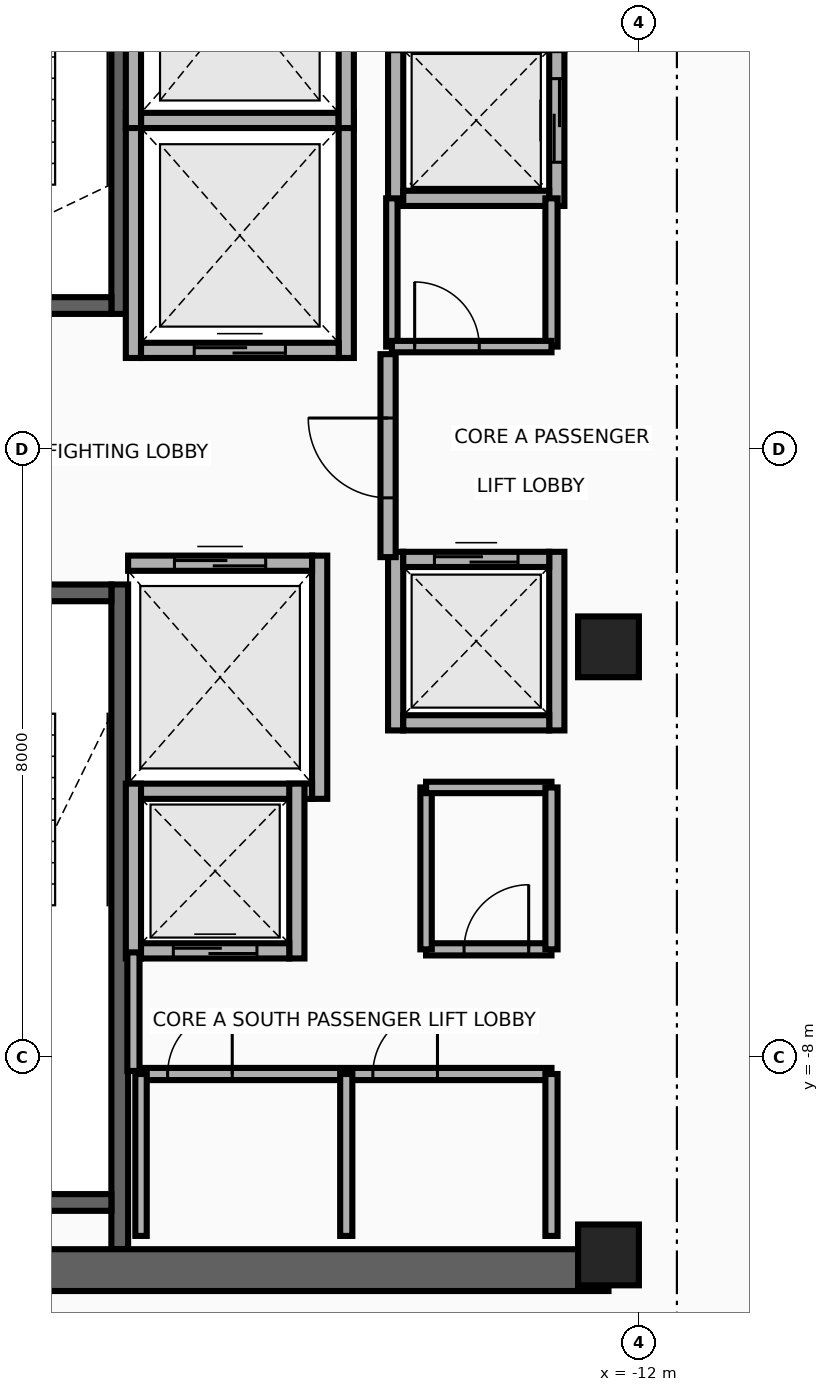
"""IFC4 building model, lengths in metres.
Left out: names, types, materials, properties, quantities, classifications, styles, units other than length and angle.
Written with IfcOpenShell. Run it as: python <this file> out.ifc"""

import sys

from ifc_helpers import new_model, si_unit, direction, frame, frame_2d, origin, origin_2d, place, context, subcontext, project, spatial, rectangle, extrude, source, transform, mapped, element, fill, save


model = new_model("IFC4")
c1 = context("Model", 3, precision=1e-05, world=origin(), true_north=direction((0.0, 1.0)))
c2 = subcontext(c1, "Body", "Model", "MODEL_VIEW")
j1 = project(units=[si_unit("LENGTHUNIT", "METRE"), si_unit("PLANEANGLEUNIT", "RADIAN")], contexts=[c1])
p1 = place(None, origin())
s1 = spatial("IfcSite", under=j1, at=p1, CompositionType="ELEMENT")
p2 = place(p1, origin())
s2 = spatial("IfcBuilding", under=s1, at=p2, CompositionType="ELEMENT")
p3 = place(p2, frame((0.0, 0.0, 244.0)))
s3 = spatial("IfcBuildingStorey", under=s2, at=p3, CompositionType="ELEMENT", Elevation=244.0)
p4 = place(p3, frame((-18.83, 1.78, 0.0), z_axis=(0.0, 0.0, 1.0), x_axis=(0.0, 1.0, 0.0)))
e1 = element("IfcWall", 1, at=p4, inside=s3, PredefinedType="SHEAR", context=c2, shape_type="SweptSolid", body=[
    extrude(rectangle(XDim=8.745, YDim=0.22, at=frame_2d((4.373, 0.0))), origin(), (0.0, 0.0, 1.0), 3.26),
])
p5 = place(p3, frame((-22.05, 1.89, 0.0), z_axis=(0.0, 0.0, 1.0), x_axis=(1.0, 0.0, 0.0)))
e2 = element("IfcWall", 2, at=p5, inside=s3, PredefinedType="SHEAR", context=c2, shape_type="SweptSolid", body=[
    extrude(rectangle(XDim=3.11, YDim=0.22, at=frame_2d((1.555, 0.0))), origin(), (0.0, 0.0, 1.0), 3.26),
])
p6 = place(p5, frame((1.0, 0.0, 0.0)))
e3 = element("IfcOpeningElement", 3, at=p6, cuts=e2, PredefinedType="OPENING", context=c2, shape_type="SweptSolid", body=[
    extrude(rectangle(XDim=1.1, YDim=2.15, at=frame_2d((0.55, 1.075))), frame((0.0, 0.125, 0.0), z_axis=(0.0, -1.0, 0.0), x_axis=(1.0, 0.0, 0.0)), (0.0, 0.0, 1.0), 0.25),
])
p7 = place(p3, frame((-18.83, -10.525, 0.0), z_axis=(0.0, 0.0, 1.0), x_axis=(0.0, 1.0, 0.0)))
e4 = element("IfcWall", 4, at=p7, inside=s3, PredefinedType="SHEAR", context=c2, shape_type="SweptSolid", body=[
    extrude(rectangle(XDim=8.745, YDim=0.22, at=frame_2d((4.373, 0.0))), origin(), (0.0, 0.0, 1.0), 3.26),
])
p8 = place(p3, frame((-22.05, -9.91, 0.0), z_axis=(0.0, 0.0, 1.0), x_axis=(1.0, 0.0, 0.0)))
e5 = element("IfcWall", 5, at=p8, inside=s3, PredefinedType="SHEAR", context=c2, shape_type="SweptSolid", body=[
    extrude(rectangle(XDim=3.11, YDim=0.22, at=frame_2d((1.555, 0.0))), origin(), (0.0, 0.0, 1.0), 3.26),
])
p9 = place(p3, frame((-22.05, -1.89, 0.0), z_axis=(0.0, 0.0, 1.0), x_axis=(1.0, 0.0, 0.0)))
e6 = element("IfcWall", 6, at=p9, inside=s3, PredefinedType="SHEAR", context=c2, shape_type="SweptSolid", body=[
    extrude(rectangle(XDim=3.11, YDim=0.22, at=frame_2d((1.555, 0.0))), origin(), (0.0, 0.0, 1.0), 3.26),
])
p10 = place(p9, frame((1.0, 0.0, 0.0)))
e7 = element("IfcOpeningElement", 7, at=p10, cuts=e6, PredefinedType="OPENING", context=c2, shape_type="SweptSolid", body=[
    extrude(rectangle(XDim=1.1, YDim=2.15, at=frame_2d((0.55, 1.075))), frame((0.0, 0.125, 0.0), z_axis=(0.0, -1.0, 0.0), x_axis=(1.0, 0.0, 0.0)), (0.0, 0.0, 1.0), 0.25),
])
p11 = place(p3, frame((-22.65, -10.8, 0.0), z_axis=(0.0, 0.0, 1.0), x_axis=(1.0, 0.0, 0.0)))
e8 = element("IfcWall", 8, at=p11, inside=s3, PredefinedType="SHEAR", context=c2, shape_type="SweptSolid", body=[
    extrude(rectangle(XDim=10.25, YDim=0.55, at=frame_2d((5.125, 0.0))), origin(), (0.0, 0.0, 1.0), 3.26),
])
m1 = source(origin(), c2, "Body", "SweptSolid", [
    extrude(rectangle(XDim=0.8, YDim=0.8, at=origin_2d()), origin(), (0.0, 0.0, 1.0), 3.5),
])
for number, where, z_axis, x_axis in (
    (9, (-12.4, -10.6, 0.0), (0.0, 0.0, 1.0), (1.0, 0.0, 0.0)),
    (10, (-12.4, -2.6, 0.0), (0.0, 0.0, 1.0), (1.0, 0.0, 0.0)),
):
    element("IfcColumn", number, at=place(p3, frame(where, z_axis=z_axis, x_axis=x_axis)), inside=s3, PredefinedType="COLUMN", context=c2, shape_type="MappedRepresentation", body=[
        mapped(m1, transform((0.0, 0.0, 0.0), x_axis=(1.0, 0.0, 0.0), y_axis=(0.0, 1.0, 0.0), z_axis=(0.0, 0.0, 1.0), scale=1.0)),
    ])
for number, where, z_axis, x_axis in (
    (11, (-18.65, 1.2, 0.0), (0.0, 0.0, 1.0), (0.0, 1.0, 0.0)),
    (12, (-15.85, 1.2, 0.0), (0.0, 0.0, 1.0), (0.0, 1.0, 0.0)),
):
    element("IfcWall", number, at=place(p3, frame(where, z_axis=z_axis, x_axis=x_axis)), inside=s3, PredefinedType="MOVABLE", context=c2, shape_type="SweptSolid", body=[
        extrude(rectangle(XDim=3.225, YDim=0.2, at=frame_2d((1.613, 0.0))), origin(), (0.0, 0.0, 1.0), 3.26),
    ])
p12 = place(p3, frame((-18.55, 1.3, 0.0), z_axis=(0.0, 0.0, 1.0), x_axis=(1.0, 0.0, 0.0)))
e13 = element("IfcWall", 13, at=p12, inside=s3, PredefinedType="MOVABLE", context=c2, shape_type="SweptSolid", body=[
    extrude(rectangle(XDim=2.6, YDim=0.2, at=frame_2d((1.3, 0.0))), origin(), (0.0, 0.0, 1.0), 3.26),
])
p13 = place(p12, frame((0.7, 0.0, 0.0)))
e14 = element("IfcOpeningElement", 14, at=p13, cuts=e13, PredefinedType="OPENING", context=c2, shape_type="SweptSolid", body=[
    extrude(rectangle(XDim=1.2, YDim=2.1, at=frame_2d((0.6, 1.05))), frame((0.0, 0.115, 0.0), z_axis=(0.0, -1.0, 0.0), x_axis=(1.0, 0.0, 0.0)), (0.0, 0.0, 1.0), 0.23),
])
p14 = place(p3, frame((-18.55, 4.325, 0.0), z_axis=(0.0, 0.0, 1.0), x_axis=(1.0, 0.0, 0.0)))
e15 = element("IfcWall", 15, at=p14, inside=s3, PredefinedType="MOVABLE", context=c2, shape_type="SweptSolid", body=[
    extrude(rectangle(XDim=2.6, YDim=0.2, at=frame_2d((1.3, 0.0))), origin(), (0.0, 0.0, 1.0), 3.26),
])
p15 = place(p3, frame((-16.2, -4.6, 0.0), z_axis=(0.0, 0.0, 1.0), x_axis=(0.0, 1.0, 0.0)))
e16 = element("IfcWall", 16, at=p15, inside=s3, PredefinedType="MOVABLE", context=c2, shape_type="SweptSolid", body=[
    extrude(rectangle(XDim=3.2, YDim=0.2, at=frame_2d((1.6, 0.0))), origin(), (0.0, 0.0, 1.0), 3.26),
])
p16 = place(p3, frame((-18.72, -4.5, 0.0), z_axis=(0.0, 0.0, 1.0), x_axis=(1.0, 0.0, 0.0)))
e17 = element("IfcWall", 17, at=p16, inside=s3, PredefinedType="MOVABLE", context=c2, shape_type="SweptSolid", body=[
    extrude(rectangle(XDim=2.42, YDim=0.2, at=frame_2d((1.21, 0.0))), origin(), (0.0, 0.0, 1.0), 3.26),
])
p17 = place(p3, frame((-18.72, -1.5, 0.0), z_axis=(0.0, 0.0, 1.0), x_axis=(1.0, 0.0, 0.0)))
e18 = element("IfcWall", 18, at=p17, inside=s3, PredefinedType="MOVABLE", context=c2, shape_type="SweptSolid", body=[
    extrude(rectangle(XDim=2.42, YDim=0.2, at=frame_2d((1.21, 0.0))), origin(), (0.0, 0.0, 1.0), 3.26),
])
p18 = place(p17, frame((0.61, 0.0, 0.0)))
e19 = element("IfcOpeningElement", 19, at=p18, cuts=e18, PredefinedType="OPENING", context=c2, shape_type="SweptSolid", body=[
    extrude(rectangle(XDim=1.2, YDim=2.1, at=frame_2d((0.6, 1.05))), frame((0.0, 0.115, 0.0), z_axis=(0.0, -1.0, 0.0), x_axis=(1.0, 0.0, 0.0)), (0.0, 0.0, 1.0), 0.23),
])
for number, where, z_axis, x_axis in (
    (20, (-18.65, 4.225, 0.0), (0.0, 0.0, 1.0), (0.0, 1.0, 0.0)),
    (21, (-15.85, 4.225, 0.0), (0.0, 0.0, 1.0), (0.0, 1.0, 0.0)),
):
    element("IfcWall", number, at=place(p3, frame(where, z_axis=z_axis, x_axis=x_axis)), inside=s3, PredefinedType="MOVABLE", context=c2, shape_type="SweptSolid", body=[
        extrude(rectangle(XDim=3.325, YDim=0.2, at=frame_2d((1.663, 0.0))), origin(), (0.0, 0.0, 1.0), 3.26),
    ])
p19 = place(p3, frame((-15.2, 3.2, 0.0), z_axis=(0.0, 0.0, 1.0), x_axis=(0.0, 1.0, 0.0)))
e22 = element("IfcWall", 22, at=p19, inside=s3, PredefinedType="MOVABLE", context=c2, shape_type="SweptSolid", body=[
    extrude(rectangle(XDim=2.25, YDim=0.2, at=frame_2d((1.125, 0.0))), origin(), (0.0, 0.0, 1.0), 3.26),
])
p20 = place(p3, frame((-13.08, 3.2, 0.0), z_axis=(0.0, 0.0, 1.0), x_axis=(0.0, 1.0, 0.0)))
e23 = element("IfcWall", 23, at=p20, inside=s3, PredefinedType="MOVABLE", context=c2, shape_type="SweptSolid", body=[
    extrude(rectangle(XDim=2.25, YDim=0.2, at=frame_2d((1.125, 0.0))), origin(), (0.0, 0.0, 1.0), 3.26),
])
p21 = place(p20, frame((0.575, 0.0, 0.0)))
e24 = element("IfcOpeningElement", 24, at=p21, cuts=e23, PredefinedType="OPENING", context=c2, shape_type="SweptSolid", body=[
    extrude(rectangle(XDim=1.1, YDim=2.1, at=frame_2d((0.55, 1.05))), frame((0.0, 0.115, 0.0), z_axis=(0.0, -1.0, 0.0), x_axis=(1.0, 0.0, 0.0)), (0.0, 0.0, 1.0), 0.23),
])
p22 = place(p3, frame((-15.1, 3.3, 0.0), z_axis=(0.0, 0.0, 1.0), x_axis=(1.0, 0.0, 0.0)))
e25 = element("IfcWall", 25, at=p22, inside=s3, PredefinedType="MOVABLE", context=c2, shape_type="SweptSolid", body=[
    extrude(rectangle(XDim=1.92, YDim=0.2, at=frame_2d((0.96, 0.0))), origin(), (0.0, 0.0, 1.0), 3.26),
])
for number, where, z_axis, x_axis in (
    (26, (-18.65, -6.7, 0.0), (0.0, 0.0, 1.0), (0.0, 1.0, 0.0)),
    (27, (-16.5, -6.7, 0.0), (0.0, 0.0, 1.0), (0.0, 1.0, 0.0)),
):
    element("IfcWall", number, at=place(p3, frame(where, z_axis=z_axis, x_axis=x_axis)), inside=s3, PredefinedType="MOVABLE", context=c2, shape_type="SweptSolid", body=[
        extrude(rectangle(XDim=2.3, YDim=0.2, at=frame_2d((1.15, 0.0))), origin(), (0.0, 0.0, 1.0), 3.26),
    ])
p23 = place(p3, frame((-18.55, -6.6, 0.0), z_axis=(0.0, 0.0, 1.0), x_axis=(1.0, 0.0, 0.0)))
e28 = element("IfcWall", 28, at=p23, inside=s3, PredefinedType="MOVABLE", context=c2, shape_type="SweptSolid", body=[
    extrude(rectangle(XDim=1.95, YDim=0.2, at=frame_2d((0.975, 0.0))), origin(), (0.0, 0.0, 1.0), 3.26),
])
p24 = place(p23, frame((0.425, 0.0, 0.0)))
e29 = element("IfcOpeningElement", 29, at=p24, cuts=e28, PredefinedType="OPENING", context=c2, shape_type="SweptSolid", body=[
    extrude(rectangle(XDim=1.1, YDim=2.1, at=frame_2d((0.55, 1.05))), frame((0.0, 0.115, 0.0), z_axis=(0.0, -1.0, 0.0), x_axis=(1.0, 0.0, 0.0)), (0.0, 0.0, 1.0), 0.23),
])
for number, where, z_axis, x_axis in (
    (30, (-15.2, -3.7, 0.0), (0.0, 0.0, 1.0), (0.0, 1.0, 0.0)),
    (31, (-13.08, -3.7, 0.0), (0.0, 0.0, 1.0), (0.0, 1.0, 0.0)),
):
    element("IfcWall", number, at=place(p3, frame(where, z_axis=z_axis, x_axis=x_axis)), inside=s3, PredefinedType="MOVABLE", context=c2, shape_type="SweptSolid", body=[
        extrude(rectangle(XDim=2.35, YDim=0.2, at=frame_2d((1.175, 0.0))), origin(), (0.0, 0.0, 1.0), 3.26),
    ])
p25 = place(p3, frame((-15.1, -3.6, 0.0), z_axis=(0.0, 0.0, 1.0), x_axis=(1.0, 0.0, 0.0)))
e32 = element("IfcWall", 32, at=p25, inside=s3, PredefinedType="MOVABLE", context=c2, shape_type="SweptSolid", body=[
    extrude(rectangle(XDim=1.92, YDim=0.2, at=frame_2d((0.96, 0.0))), origin(), (0.0, 0.0, 1.0), 3.26),
])
p26 = place(p3, frame((-15.1, -1.45, 0.0), z_axis=(0.0, 0.0, 1.0), x_axis=(1.0, 0.0, 0.0)))
e33 = element("IfcWall", 33, at=p26, inside=s3, PredefinedType="MOVABLE", context=c2, shape_type="SweptSolid", body=[
    extrude(rectangle(XDim=1.92, YDim=0.2, at=frame_2d((0.96, 0.0))), origin(), (0.0, 0.0, 1.0), 3.26),
])
p27 = place(p26, frame((0.41, 0.0, 0.0)))
e34 = element("IfcOpeningElement", 34, at=p27, cuts=e33, PredefinedType="OPENING", context=c2, shape_type="SweptSolid", body=[
    extrude(rectangle(XDim=1.1, YDim=2.1, at=frame_2d((0.55, 1.05))), frame((0.0, 0.115, 0.0), z_axis=(0.0, -1.0, 0.0), x_axis=(1.0, 0.0, 0.0)), (0.0, 0.0, 1.0), 0.23),
])
p28 = place(p3, frame((-15.3, -1.42, 0.0), z_axis=(0.0, 0.0, 1.0), x_axis=(0.0, 1.0, 0.0)))
e35 = element("IfcWall", 35, at=p28, inside=s3, PredefinedType="PARTITIONING", context=c2, shape_type="SweptSolid", body=[
    extrude(rectangle(XDim=2.67, YDim=0.2, at=frame_2d((1.335, 0.0))), origin(), (0.0, 0.0, 1.0), 3.26),
])
p29 = place(p28, frame((0.78, 0.0, 0.0)))
e36 = element("IfcOpeningElement", 36, at=p29, cuts=e35, PredefinedType="OPENING", context=c2, shape_type="SweptSolid", body=[
    extrude(rectangle(XDim=1.05, YDim=2.15, at=frame_2d((0.525, 1.075))), frame((0.0, 0.115, 0.0), z_axis=(0.0, -1.0, 0.0), x_axis=(1.0, 0.0, 0.0)), (0.0, 0.0, 1.0), 0.23),
])
p30 = place(p3, frame((-18.65, -8.18, 0.0), z_axis=(0.0, 0.0, 1.0), x_axis=(0.0, 1.0, 0.0)))
e37 = element("IfcWall", 37, at=p30, inside=s3, PredefinedType="PARTITIONING", context=c2, shape_type="SweptSolid", body=[
    extrude(rectangle(XDim=1.56, YDim=0.16, at=frame_2d((0.78, 0.0))), origin(), (0.0, 0.0, 1.0), 3.26),
])
p31 = place(p3, frame((-18.55, -8.22, 0.0), z_axis=(0.0, 0.0, 1.0), x_axis=(1.0, 0.0, 0.0)))
e38 = element("IfcWall", 38, at=p31, inside=s3, PredefinedType="PARTITIONING", context=c2, shape_type="SweptSolid", body=[
    extrude(rectangle(XDim=5.4, YDim=0.16, at=frame_2d((2.7, 0.0))), origin(), (0.0, 0.0, 1.0), 3.26),
])
p32 = place(p31, frame((0.35, 0.0, 0.0)))
e39 = element("IfcOpeningElement", 39, at=p32, cuts=e38, PredefinedType="OPENING", context=c2, shape_type="SweptSolid", body=[
    extrude(rectangle(XDim=0.85, YDim=2.05, at=frame_2d((0.425, 1.025))), frame((0.0, 0.095, 0.0), z_axis=(0.0, -1.0, 0.0), x_axis=(1.0, 0.0, 0.0)), (0.0, 0.0, 1.0), 0.19),
])
p33 = place(p31, frame((3.05, 0.0, 0.0)))
e40 = element("IfcOpeningElement", 40, at=p33, cuts=e38, PredefinedType="OPENING", context=c2, shape_type="SweptSolid", body=[
    extrude(rectangle(XDim=0.85, YDim=2.05, at=frame_2d((0.425, 1.025))), frame((0.0, 0.095, 0.0), z_axis=(0.0, -1.0, 0.0), x_axis=(1.0, 0.0, 0.0)), (0.0, 0.0, 1.0), 0.19),
])
p34 = place(p3, frame((-18.55, -10.35, 0.0), z_axis=(0.0, 0.0, 1.0), x_axis=(0.0, 1.0, 0.0)))
e41 = element("IfcWall", 41, at=p34, inside=s3, PredefinedType="PARTITIONING", context=c2, shape_type="SweptSolid", body=[
    extrude(rectangle(XDim=2.13, YDim=0.15, at=frame_2d((1.065, 0.0))), origin(), (0.0, 0.0, 1.0), 3.26),
])
for number, where, z_axis, x_axis in (
    (42, (-13.15, -10.35, 0.0), (0.0, 0.0, 1.0), (0.0, 1.0, 0.0)),
    (43, (-15.85, -10.35, 0.0), (0.0, 0.0, 1.0), (0.0, 1.0, 0.0)),
):
    element("IfcWall", number, at=place(p3, frame(where, z_axis=z_axis, x_axis=x_axis)), inside=s3, PredefinedType="PARTITIONING", context=c2, shape_type="SweptSolid", body=[
        extrude(rectangle(XDim=2.13, YDim=0.16, at=frame_2d((1.065, 0.0))), origin(), (0.0, 0.0, 1.0), 3.26),
    ])
p35 = place(p3, frame((-14.8, -6.58, 0.0), z_axis=(0.0, 0.0, 1.0), x_axis=(1.0, 0.0, 0.0)))
e44 = element("IfcWall", 44, at=p35, inside=s3, PredefinedType="PARTITIONING", context=c2, shape_type="SweptSolid", body=[
    extrude(rectangle(XDim=1.65, YDim=0.16, at=frame_2d((0.825, 0.0))), origin(), (0.0, 0.0, 1.0), 3.26),
])
p36 = place(p35, frame((0.5, 0.0, 0.0)))
e45 = element("IfcOpeningElement", 45, at=p36, cuts=e44, PredefinedType="OPENING", context=c2, shape_type="SweptSolid", body=[
    extrude(rectangle(XDim=0.85, YDim=2.05, at=frame_2d((0.425, 1.025))), frame((0.0, 0.095, 0.0), z_axis=(0.0, -1.0, 0.0), x_axis=(1.0, 0.0, 0.0)), (0.0, 0.0, 1.0), 0.19),
])
p37 = place(p3, frame((-14.8, -6.58, 0.0), z_axis=(0.0, 0.0, 1.0), x_axis=(0.0, 1.0, 0.0)))
e46 = element("IfcWall", 46, at=p37, inside=s3, PredefinedType="PARTITIONING", context=c2, shape_type="SweptSolid", body=[
    extrude(rectangle(XDim=2.13, YDim=0.15, at=frame_2d((1.065, 0.0))), origin(), (0.0, 0.0, 1.0), 3.26),
])
p38 = place(p3, frame((-14.8, -4.45, 0.0), z_axis=(0.0, 0.0, 1.0), x_axis=(1.0, 0.0, 0.0)))
e47 = element("IfcWall", 47, at=p38, inside=s3, PredefinedType="PARTITIONING", context=c2, shape_type="SweptSolid", body=[
    extrude(rectangle(XDim=1.65, YDim=0.15, at=frame_2d((0.825, 0.0))), origin(), (0.0, 0.0, 1.0), 3.26),
])
p39 = place(p3, frame((-13.15, -6.58, 0.0), z_axis=(0.0, 0.0, 1.0), x_axis=(0.0, 1.0, 0.0)))
e48 = element("IfcWall", 48, at=p39, inside=s3, PredefinedType="PARTITIONING", context=c2, shape_type="SweptSolid", body=[
    extrude(rectangle(XDim=2.13, YDim=0.16, at=frame_2d((1.065, 0.0))), origin(), (0.0, 0.0, 1.0), 3.26),
])
p40 = place(p3, frame((-13.15, 1.35, 0.0), z_axis=(0.0, 0.0, 1.0), x_axis=(0.0, 1.0, 0.0)))
e49 = element("IfcWall", 49, at=p40, inside=s3, PredefinedType="PARTITIONING", context=c2, shape_type="SweptSolid", body=[
    extrude(rectangle(XDim=1.95, YDim=0.16, at=frame_2d((0.975, 0.0))), origin(), (0.0, 0.0, 1.0), 3.26),
])
p41 = place(p3, frame((-15.25, 1.35, 0.0), z_axis=(0.0, 0.0, 1.0), x_axis=(0.0, 1.0, 0.0)))
e50 = element("IfcWall", 50, at=p41, inside=s3, PredefinedType="PARTITIONING", context=c2, shape_type="SweptSolid", body=[
    extrude(rectangle(XDim=1.95, YDim=0.15, at=frame_2d((0.975, 0.0))), origin(), (0.0, 0.0, 1.0), 3.26),
])
p42 = place(p3, frame((-15.25, 1.35, 0.0), z_axis=(0.0, 0.0, 1.0), x_axis=(1.0, 0.0, 0.0)))
e51 = element("IfcWall", 51, at=p42, inside=s3, PredefinedType="PARTITIONING", context=c2, shape_type="SweptSolid", body=[
    extrude(rectangle(XDim=2.1, YDim=0.15, at=frame_2d((1.05, 0.0))), origin(), (0.0, 0.0, 1.0), 3.26),
])
p43 = place(p42, frame((0.3, 0.0, 0.0)))
e52 = element("IfcOpeningElement", 52, at=p43, cuts=e51, PredefinedType="OPENING", context=c2, shape_type="SweptSolid", body=[
    extrude(rectangle(XDim=0.85, YDim=2.05, at=frame_2d((0.425, 1.025))), frame((0.0, 0.09, 0.0), z_axis=(0.0, -1.0, 0.0), x_axis=(1.0, 0.0, 0.0)), (0.0, 0.0, 1.0), 0.18),
])
p44 = place(p13, origin())
e53 = element("IfcDoor", 53, at=p44, inside=s3, OperationType="DOUBLE_DOOR_SLIDING", PredefinedType="DOOR", context=c2, shape_type="SweptSolid", body=[
    extrude(rectangle(XDim=1.2, YDim=2.1, at=frame_2d((0.6, 1.05))), frame((0.0, 0.025, 0.0), z_axis=(0.0, -1.0, 0.0), x_axis=(1.0, 0.0, 0.0)), (0.0, 0.0, 1.0), 0.05),
])
fill(e14, e53)
p45 = place(p18, origin())
e54 = element("IfcDoor", 54, at=p45, inside=s3, OperationType="DOUBLE_DOOR_SLIDING", PredefinedType="DOOR", context=c2, shape_type="SweptSolid", body=[
    extrude(rectangle(XDim=1.2, YDim=2.1, at=frame_2d((0.6, 1.05))), frame((0.0, 0.025, 0.0), z_axis=(0.0, -1.0, 0.0), x_axis=(1.0, 0.0, 0.0)), (0.0, 0.0, 1.0), 0.05),
])
fill(e19, e54)
p46 = place(p21, origin())
e55 = element("IfcDoor", 55, at=p46, inside=s3, OperationType="DOUBLE_DOOR_SLIDING", PredefinedType="DOOR", context=c2, shape_type="SweptSolid", body=[
    extrude(rectangle(XDim=1.1, YDim=2.1, at=frame_2d((0.55, 1.05))), frame((0.0, 0.025, 0.0), z_axis=(0.0, -1.0, 0.0), x_axis=(1.0, 0.0, 0.0)), (0.0, 0.0, 1.0), 0.05),
])
fill(e24, e55)
p47 = place(p24, origin())
e56 = element("IfcDoor", 56, at=p47, inside=s3, OperationType="DOUBLE_DOOR_SLIDING", PredefinedType="DOOR", context=c2, shape_type="SweptSolid", body=[
    extrude(rectangle(XDim=1.1, YDim=2.1, at=frame_2d((0.55, 1.05))), frame((0.0, 0.025, 0.0), z_axis=(0.0, -1.0, 0.0), x_axis=(1.0, 0.0, 0.0)), (0.0, 0.0, 1.0), 0.05),
])
fill(e29, e56)
p48 = place(p27, origin())
e57 = element("IfcDoor", 57, at=p48, inside=s3, OperationType="DOUBLE_DOOR_SLIDING", PredefinedType="DOOR", context=c2, shape_type="SweptSolid", body=[
    extrude(rectangle(XDim=1.1, YDim=2.1, at=frame_2d((0.55, 1.05))), frame((0.0, 0.025, 0.0), z_axis=(0.0, -1.0, 0.0), x_axis=(1.0, 0.0, 0.0)), (0.0, 0.0, 1.0), 0.05),
])
fill(e34, e57)
p49 = place(p29, origin())
e58 = element("IfcDoor", 58, at=p49, inside=s3, OperationType="SINGLE_SWING_RIGHT", PredefinedType="DOOR", context=c2, shape_type="SweptSolid", body=[
    extrude(rectangle(XDim=1.05, YDim=2.15, at=frame_2d((0.525, 1.075))), frame((0.0, 0.025, 0.0), z_axis=(0.0, -1.0, 0.0), x_axis=(1.0, 0.0, 0.0)), (0.0, 0.0, 1.0), 0.05),
])
fill(e36, e58)
p50 = place(p32, origin())
e59 = element("IfcDoor", 59, at=p50, inside=s3, OperationType="SINGLE_SWING_LEFT", PredefinedType="DOOR", context=c2, shape_type="SweptSolid", body=[
    extrude(rectangle(XDim=0.85, YDim=2.05, at=frame_2d((0.425, 1.025))), frame((0.0, 0.025, 0.0), z_axis=(0.0, -1.0, 0.0), x_axis=(1.0, 0.0, 0.0)), (0.0, 0.0, 1.0), 0.05),
])
fill(e39, e59)
p51 = place(p33, origin())
e60 = element("IfcDoor", 60, at=p51, inside=s3, OperationType="SINGLE_SWING_RIGHT", PredefinedType="DOOR", context=c2, shape_type="SweptSolid", body=[
    extrude(rectangle(XDim=0.85, YDim=2.05, at=frame_2d((0.425, 1.025))), frame((0.0, 0.025, 0.0), z_axis=(0.0, -1.0, 0.0), x_axis=(1.0, 0.0, 0.0)), (0.0, 0.0, 1.0), 0.05),
])
fill(e40, e60)
p52 = place(p36, origin())
e61 = element("IfcDoor", 61, at=p52, inside=s3, OperationType="SINGLE_SWING_LEFT", PredefinedType="DOOR", context=c2, shape_type="SweptSolid", body=[
    extrude(rectangle(XDim=0.85, YDim=2.05, at=frame_2d((0.425, 1.025))), frame((0.0, 0.025, 0.0), z_axis=(0.0, -1.0, 0.0), x_axis=(1.0, 0.0, 0.0)), (0.0, 0.0, 1.0), 0.05),
])
fill(e45, e61)
p53 = place(p43, origin())
e62 = element("IfcDoor", 62, at=p53, inside=s3, OperationType="SINGLE_SWING_RIGHT", PredefinedType="DOOR", context=c2, shape_type="SweptSolid", body=[
    extrude(rectangle(XDim=0.85, YDim=2.05, at=frame_2d((0.425, 1.025))), frame((0.0, 0.025, 0.0), z_axis=(0.0, -1.0, 0.0), x_axis=(1.0, 0.0, 0.0)), (0.0, 0.0, 1.0), 0.05),
])
fill(e52, e62)
save(model, sys.argv[1])
